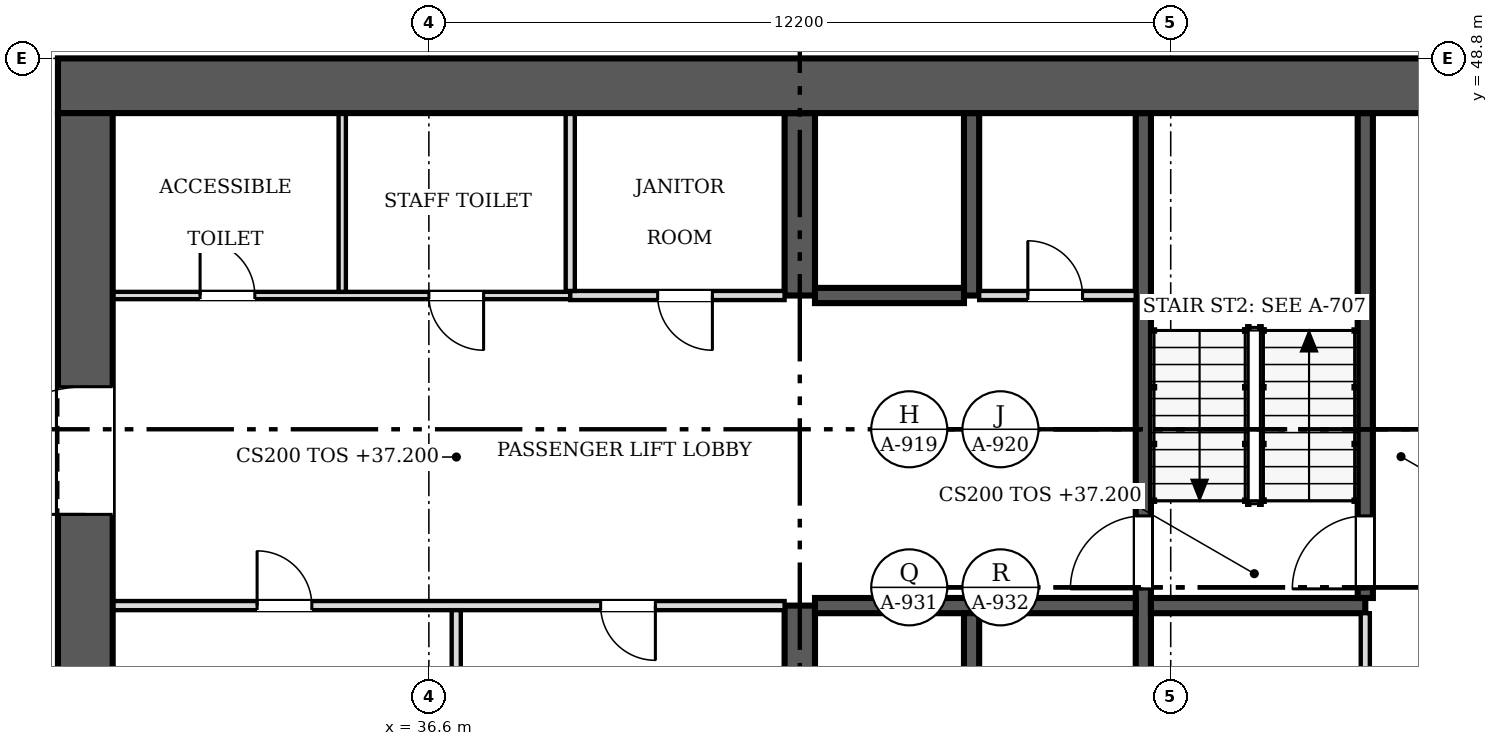
"""IFC4 building model, lengths in metres.
Left out: names, types, materials, properties, quantities, classifications, styles, units other than length and angle.
Written with IfcOpenShell. Run it as: python <this file> out.ifc"""

import sys

from ifc_helpers import new_model, si_unit, direction, frame, frame_2d, origin, place, context, subcontext, project, spatial, rectangle, extrude, source, transform, mapped, element, fill, save


model = new_model("IFC4")
c1 = context("Model", 3, precision=1e-05, world=origin(), true_north=direction((0.0, 1.0)))
c2 = subcontext(c1, "Body", "Model", "MODEL_VIEW")
j1 = project(units=[si_unit("LENGTHUNIT", "METRE"), si_unit("PLANEANGLEUNIT", "RADIAN")], contexts=[c1])
p1 = place(None, origin())
s1 = spatial("IfcSite", under=j1, at=p1, CompositionType="ELEMENT")
p2 = place(p1, origin())
s2 = spatial("IfcBuilding", under=s1, at=p2, CompositionType="ELEMENT")
p3 = place(p2, frame((0.0, 0.0, 37.2)))
s3 = spatial("IfcBuildingStorey", under=s2, at=p3, CompositionType="ELEMENT", Elevation=37.2)
p4 = place(p3, frame((30.95, 25.3, 0.0), z_axis=(0.0, 0.0, 1.0), x_axis=(0.0, 1.0, 0.0)))
e1 = element("IfcWall", 1, at=p4, inside=s3, PredefinedType="SHEAR", context=c2, shape_type="SweptSolid", body=[
    extrude(rectangle(XDim=22.6, YDim=0.9, at=frame_2d((11.3, 0.0))), origin(), (0.0, 0.0, 1.0), 3.8),
])
m1 = source(origin(), c2, "Body", "SweptSolid", [
    extrude(rectangle(XDim=2.1, YDim=2.4, at=frame_2d((1.05, 1.2))), frame((0.0, 0.46, 0.0), z_axis=(0.0, -1.0, 0.0), x_axis=(1.0, 0.0, 0.0)), (0.0, 0.0, 1.0), 0.92),
])
p5 = place(p4, frame((4.5, 0.0, 0.0)))
e2 = element("IfcOpeningElement", 2, at=p5, cuts=e1, PredefinedType="OPENING", context=c2, shape_type="MappedRepresentation", body=[
    mapped(m1, transform((0.0, 0.0, 0.0), scale=1.0)),
])
p6 = place(p4, frame((16.0, 0.0, 0.0)))
e3 = element("IfcOpeningElement", 3, at=p6, cuts=e1, PredefinedType="OPENING", context=c2, shape_type="MappedRepresentation", body=[
    mapped(m1, transform((0.0, 0.0, 0.0), scale=1.0)),
])
p7 = place(p3, frame((30.5, 48.35, 0.0), z_axis=(0.0, 0.0, 1.0), x_axis=(1.0, 0.0, 0.0)))
e4 = element("IfcWall", 4, at=p7, inside=s3, PredefinedType="SHEAR", context=c2, shape_type="SweptSolid", body=[
    extrude(rectangle(XDim=24.4, YDim=0.9, at=frame_2d((12.2, 0.0))), origin(), (0.0, 0.0, 1.0), 3.8),
])
p8 = place(p3, frame((42.7, 36.85, 0.0), z_axis=(0.0, 0.0, 1.0), x_axis=(0.0, 1.0, 0.0)))
e5 = element("IfcWall", 5, at=p8, inside=s3, PredefinedType="SHEAR", context=c2, shape_type="SweptSolid", body=[
    extrude(rectangle(XDim=2.95, YDim=0.5, at=frame_2d((1.475, 0.0))), origin(), (0.0, 0.0, 1.0), 3.8),
])
p9 = place(p3, frame((42.7, 44.9, 0.0), z_axis=(0.0, 0.0, 1.0), x_axis=(0.0, 1.0, 0.0)))
e6 = element("IfcWall", 6, at=p9, inside=s3, PredefinedType="SHEAR", context=c2, shape_type="SweptSolid", body=[
    extrude(rectangle(XDim=3.0, YDim=0.5, at=frame_2d((1.5, 0.0))), origin(), (0.0, 0.0, 1.0), 3.8),
])
p10 = place(p3, frame((48.35, 47.9, 0.0), z_axis=(0.0, 0.0, 1.0), x_axis=(0.0, -1.0, 0.0)))
e7 = element("IfcWall", 7, at=p10, inside=s3, PredefinedType="SOLIDWALL", context=c2, shape_type="SweptSolid", body=[
    extrude(rectangle(XDim=11.05, YDim=0.25, at=frame_2d((5.525, 0.0))), origin(), (0.0, 0.0, 1.0), 3.8),
])
m2 = source(origin(), c2, "Body", "SweptSolid", [
    extrude(rectangle(XDim=1.2, YDim=2.1, at=frame_2d((0.6, 1.05))), frame((0.0, 0.135, 0.0), z_axis=(0.0, -1.0, 0.0), x_axis=(1.0, 0.0, 0.0)), (0.0, 0.0, 1.0), 0.27),
])
p11 = place(p10, frame((6.625, 0.0, 0.0)))
e8 = element("IfcOpeningElement", 8, at=p11, cuts=e7, PredefinedType="OPENING", context=c2, shape_type="MappedRepresentation", body=[
    mapped(m2, transform((0.0, 0.0, 0.0), scale=1.0)),
])
p12 = place(p3, frame((42.95, 39.8, 0.0), z_axis=(0.0, 0.0, 1.0), x_axis=(1.0, 0.0, 0.0)))
e9 = element("IfcWall", 9, at=p12, inside=s3, PredefinedType="SOLIDWALL", context=c2, shape_type="SweptSolid", body=[
    extrude(rectangle(XDim=5.275, YDim=0.25, at=frame_2d((2.638, 0.0))), origin(), (0.0, 0.0, 1.0), 3.8),
])
p13 = place(p3, frame((48.475, 39.8, 0.0), z_axis=(0.0, 0.0, 1.0), x_axis=(1.0, 0.0, 0.0)))
e10 = element("IfcWall", 10, at=p13, inside=s3, PredefinedType="SOLIDWALL", context=c2, shape_type="SweptSolid", body=[
    extrude(rectangle(XDim=3.525, YDim=0.25, at=frame_2d((1.762, 0.0))), origin(), (0.0, 0.0, 1.0), 3.8),
])
p14 = place(p3, frame((52.0, 39.925, 0.0), z_axis=(0.0, 0.0, 1.0), x_axis=(0.0, 1.0, 0.0)))
e11 = element("IfcWall", 11, at=p14, inside=s3, PredefinedType="SOLIDWALL", context=c2, shape_type="SweptSolid", body=[
    extrude(rectangle(XDim=7.975, YDim=0.25, at=frame_2d((3.987, 0.0))), origin(), (0.0, 0.0, 1.0), 3.8),
])
p15 = place(p14, frame((0.15, 0.0, 0.0)))
e12 = element("IfcOpeningElement", 12, at=p15, cuts=e11, PredefinedType="OPENING", context=c2, shape_type="MappedRepresentation", body=[
    mapped(m2, transform((0.0, 0.0, 0.0), scale=1.0)),
])
p16 = place(p3, frame((45.525, 36.85, 0.0), z_axis=(0.0, 0.0, 1.0), x_axis=(0.0, 1.0, 0.0)))
e13 = element("IfcWall", 13, at=p16, inside=s3, PredefinedType="SOLIDWALL", context=c2, shape_type="SweptSolid", body=[
    extrude(rectangle(XDim=2.825, YDim=0.25, at=frame_2d((1.413, 0.0))), origin(), (0.0, 0.0, 1.0), 3.8),
])
p17 = place(p3, frame((45.525, 44.9, 0.0), z_axis=(0.0, 0.0, 1.0), x_axis=(0.0, 1.0, 0.0)))
e14 = element("IfcWall", 14, at=p17, inside=s3, PredefinedType="SOLIDWALL", context=c2, shape_type="SweptSolid", body=[
    extrude(rectangle(XDim=3.0, YDim=0.25, at=frame_2d((1.5, 0.0))), origin(), (0.0, 0.0, 1.0), 3.8),
])
p18 = place(p3, frame((42.95, 44.9, 0.0), z_axis=(0.0, 0.0, 1.0), x_axis=(1.0, 0.0, 0.0)))
e15 = element("IfcWall", 15, at=p18, inside=s3, PredefinedType="SOLIDWALL", context=c2, shape_type="SweptSolid", body=[
    extrude(rectangle(XDim=2.45, YDim=0.25, at=frame_2d((1.225, 0.0))), origin(), (0.0, 0.0, 1.0), 3.8),
])
p19 = place(p3, frame((42.45, 39.8, 0.0), z_axis=(0.0, 0.0, 1.0), x_axis=(-1.0, 0.0, 0.0)))
e16 = element("IfcWall", 16, at=p19, inside=s3, PredefinedType="PARTITIONING", context=c2, shape_type="SweptSolid", body=[
    extrude(rectangle(XDim=11.05, YDim=0.15, at=frame_2d((5.525, 0.0))), origin(), (0.0, 0.0, 1.0), 3.6),
])
m3 = source(origin(), c2, "Body", "SweptSolid", [
    extrude(rectangle(XDim=0.9, YDim=2.1, at=frame_2d((0.45, 1.05))), frame((0.0, 0.085, 0.0), z_axis=(0.0, -1.0, 0.0), x_axis=(1.0, 0.0, 0.0)), (0.0, 0.0, 1.0), 0.17),
])
p20 = place(p19, frame((7.775, 0.0, 0.0)))
e17 = element("IfcOpeningElement", 17, at=p20, cuts=e16, PredefinedType="OPENING", context=c2, shape_type="MappedRepresentation", body=[
    mapped(m3, transform((0.0, 0.0, 0.0), scale=1.0)),
])
p21 = place(p19, frame((2.125, 0.0, 0.0)))
e18 = element("IfcOpeningElement", 18, at=p21, cuts=e16, PredefinedType="OPENING", context=c2, shape_type="MappedRepresentation", body=[
    mapped(m3, transform((0.0, 0.0, 0.0), scale=1.0)),
])
p22 = place(p3, frame((31.4, 44.9, 0.0), z_axis=(0.0, 0.0, 1.0), x_axis=(1.0, 0.0, 0.0)))
e19 = element("IfcWall", 19, at=p22, inside=s3, PredefinedType="PARTITIONING", context=c2, shape_type="SweptSolid", body=[
    extrude(rectangle(XDim=7.525, YDim=0.12, at=frame_2d((3.763, 0.0))), origin(), (0.0, 0.0, 1.0), 3.6),
])
m4 = source(origin(), c2, "Body", "SweptSolid", [
    extrude(rectangle(XDim=0.9, YDim=2.1, at=frame_2d((0.45, 1.05))), frame((0.0, 0.07, 0.0), z_axis=(0.0, -1.0, 0.0), x_axis=(1.0, 0.0, 0.0)), (0.0, 0.0, 1.0), 0.14),
])
p23 = place(p22, frame((1.438, 0.0, 0.0)))
e20 = element("IfcOpeningElement", 20, at=p23, cuts=e19, PredefinedType="OPENING", context=c2, shape_type="MappedRepresentation", body=[
    mapped(m4, transform((0.0, 0.0, 0.0), scale=1.0)),
])
p24 = place(p22, frame((5.2, 0.0, 0.0)))
e21 = element("IfcOpeningElement", 21, at=p24, cuts=e19, PredefinedType="OPENING", context=c2, shape_type="MappedRepresentation", body=[
    mapped(m4, transform((0.0, 0.0, 0.0), scale=1.0)),
])
p25 = place(p3, frame((52.0, 33.525, 0.0), z_axis=(0.0, 0.0, 1.0), x_axis=(0.0, 1.0, 0.0)))
e22 = element("IfcWall", 22, at=p25, inside=s3, PredefinedType="PARTITIONING", context=c2, shape_type="SweptSolid", body=[
    extrude(rectangle(XDim=6.15, YDim=0.15, at=frame_2d((3.075, 0.0))), origin(), (0.0, 0.0, 1.0), 3.6),
])
p26 = place(p25, frame((1.025, 0.0, 0.0)))
e23 = element("IfcOpeningElement", 23, at=p26, cuts=e22, PredefinedType="OPENING", context=c2, shape_type="MappedRepresentation", body=[
    mapped(m3, transform((0.0, 0.0, 0.0), scale=1.0)),
])
p27 = place(p3, frame((38.925, 44.9, 0.0), z_axis=(0.0, 0.0, 1.0), x_axis=(1.0, 0.0, 0.0)))
e24 = element("IfcWall", 24, at=p27, inside=s3, PredefinedType="PARTITIONING", context=c2, shape_type="SweptSolid", body=[
    extrude(rectangle(XDim=3.525, YDim=0.15, at=frame_2d((1.762, 0.0))), origin(), (0.0, 0.0, 1.0), 3.6),
])
p28 = place(p27, frame((1.438, 0.0, 0.0)))
e25 = element("IfcOpeningElement", 25, at=p28, cuts=e24, PredefinedType="OPENING", context=c2, shape_type="MappedRepresentation", body=[
    mapped(m3, transform((0.0, 0.0, 0.0), scale=1.0)),
])
p29 = place(p3, frame((37.05, 36.85, 0.0), z_axis=(0.0, 0.0, 1.0), x_axis=(0.0, 1.0, 0.0)))
e26 = element("IfcWall", 26, at=p29, inside=s3, PredefinedType="PARTITIONING", context=c2, shape_type="SweptSolid", body=[
    extrude(rectangle(XDim=2.875, YDim=0.15, at=frame_2d((1.438, 0.0))), origin(), (0.0, 0.0, 1.0), 3.6),
])
p30 = place(p3, frame((35.175, 44.96, 0.0), z_axis=(0.0, 0.0, 1.0), x_axis=(0.0, 1.0, 0.0)))
e27 = element("IfcWall", 27, at=p30, inside=s3, PredefinedType="PARTITIONING", context=c2, shape_type="SweptSolid", body=[
    extrude(rectangle(XDim=2.94, YDim=0.12, at=frame_2d((1.47, 0.0))), origin(), (0.0, 0.0, 1.0), 3.6),
])
p31 = place(p3, frame((38.925, 44.975, 0.0), z_axis=(0.0, 0.0, 1.0), x_axis=(0.0, 1.0, 0.0)))
e28 = element("IfcWall", 28, at=p31, inside=s3, PredefinedType="PARTITIONING", context=c2, shape_type="SweptSolid", body=[
    extrude(rectangle(XDim=2.925, YDim=0.15, at=frame_2d((1.462, 0.0))), origin(), (0.0, 0.0, 1.0), 3.6),
])
p32 = place(p3, frame((45.65, 44.9, 0.0), z_axis=(0.0, 0.0, 1.0), x_axis=(1.0, 0.0, 0.0)))
e29 = element("IfcWall", 29, at=p32, inside=s3, PredefinedType="PARTITIONING", context=c2, shape_type="SweptSolid", body=[
    extrude(rectangle(XDim=2.575, YDim=0.15, at=frame_2d((1.288, 0.0))), origin(), (0.0, 0.0, 1.0), 3.6),
])
p33 = place(p32, frame((0.8, 0.0, 0.0)))
e30 = element("IfcOpeningElement", 30, at=p33, cuts=e29, PredefinedType="OPENING", context=c2, shape_type="MappedRepresentation", body=[
    mapped(m3, transform((0.0, 0.0, 0.0), scale=1.0)),
])
m5 = source(origin(), c2, "Body", "SweptSolid", [
    extrude(rectangle(XDim=2.1, YDim=2.4, at=frame_2d((1.05, 1.2))), frame((0.0, 0.025, 0.0), z_axis=(0.0, -1.0, 0.0), x_axis=(1.0, 0.0, 0.0)), (0.0, 0.0, 1.0), 0.05),
])
p34 = place(p6, origin())
e31 = element("IfcDoor", 31, at=p34, inside=s3, OperationType="DOUBLE_DOOR_SINGLE_SWING", PredefinedType="DOOR", context=c2, shape_type="MappedRepresentation", body=[
    mapped(m5, transform((0.0, 0.0, 0.0), scale=1.0)),
])
fill(e3, e31)
m6 = source(origin(), c2, "Body", "SweptSolid", [
    extrude(rectangle(XDim=1.2, YDim=2.1, at=frame_2d((0.6, 1.05))), frame((0.0, 0.025, 0.0), z_axis=(0.0, -1.0, 0.0), x_axis=(1.0, 0.0, 0.0)), (0.0, 0.0, 1.0), 0.05),
])
p35 = place(p11, origin())
e32 = element("IfcDoor", 32, at=p35, inside=s3, OperationType="SINGLE_SWING_RIGHT", PredefinedType="DOOR", context=c2, shape_type="MappedRepresentation", body=[
    mapped(m6, transform((0.0, 0.0, 0.0), scale=1.0)),
])
fill(e8, e32)
p36 = place(p15, origin())
e33 = element("IfcDoor", 33, at=p36, inside=s3, OperationType="SINGLE_SWING_LEFT", PredefinedType="DOOR", context=c2, shape_type="MappedRepresentation", body=[
    mapped(m6, transform((0.0, 0.0, 0.0), scale=1.0)),
])
fill(e12, e33)
m7 = source(origin(), c2, "Body", "SweptSolid", [
    extrude(rectangle(XDim=0.9, YDim=2.1, at=frame_2d((0.45, 1.05))), frame((0.0, 0.025, 0.0), z_axis=(0.0, -1.0, 0.0), x_axis=(1.0, 0.0, 0.0)), (0.0, 0.0, 1.0), 0.05),
])
p37 = place(p20, origin())
e34 = element("IfcDoor", 34, at=p37, inside=s3, OperationType="SINGLE_SWING_RIGHT", PredefinedType="DOOR", context=c2, shape_type="MappedRepresentation", body=[
    mapped(m7, transform((0.0, 0.0, 0.0), scale=1.0)),
])
fill(e17, e34)
p38 = place(p21, origin())
e35 = element("IfcDoor", 35, at=p38, inside=s3, OperationType="SINGLE_SWING_LEFT", PredefinedType="DOOR", context=c2, shape_type="MappedRepresentation", body=[
    mapped(m7, transform((0.0, 0.0, 0.0), scale=1.0)),
])
fill(e18, e35)
p39 = place(p23, origin())
e36 = element("IfcDoor", 36, at=p39, inside=s3, OperationType="SINGLE_SWING_LEFT", PredefinedType="DOOR", context=c2, shape_type="MappedRepresentation", body=[
    mapped(m7, transform((0.0, 0.0, 0.0), scale=1.0)),
])
fill(e20, e36)
p40 = place(p24, origin())
e37 = element("IfcDoor", 37, at=p40, inside=s3, OperationType="SINGLE_SWING_RIGHT", PredefinedType="DOOR", context=c2, shape_type="MappedRepresentation", body=[
    mapped(m7, transform((0.0, 0.0, 0.0), scale=1.0)),
])
fill(e21, e37)
p41 = place(p28, origin())
e38 = element("IfcDoor", 38, at=p41, inside=s3, OperationType="SINGLE_SWING_RIGHT", PredefinedType="DOOR", context=c2, shape_type="MappedRepresentation", body=[
    mapped(m7, transform((0.0, 0.0, 0.0), scale=1.0)),
])
fill(e25, e38)
p42 = place(p33, origin())
e39 = element("IfcDoor", 39, at=p42, inside=s3, OperationType="SINGLE_SWING_LEFT", PredefinedType="DOOR", context=c2, shape_type="MappedRepresentation", body=[
    mapped(m7, transform((0.0, 0.0, 0.0), scale=1.0)),
])
fill(e30, e39)
save(model, sys.argv[1])
